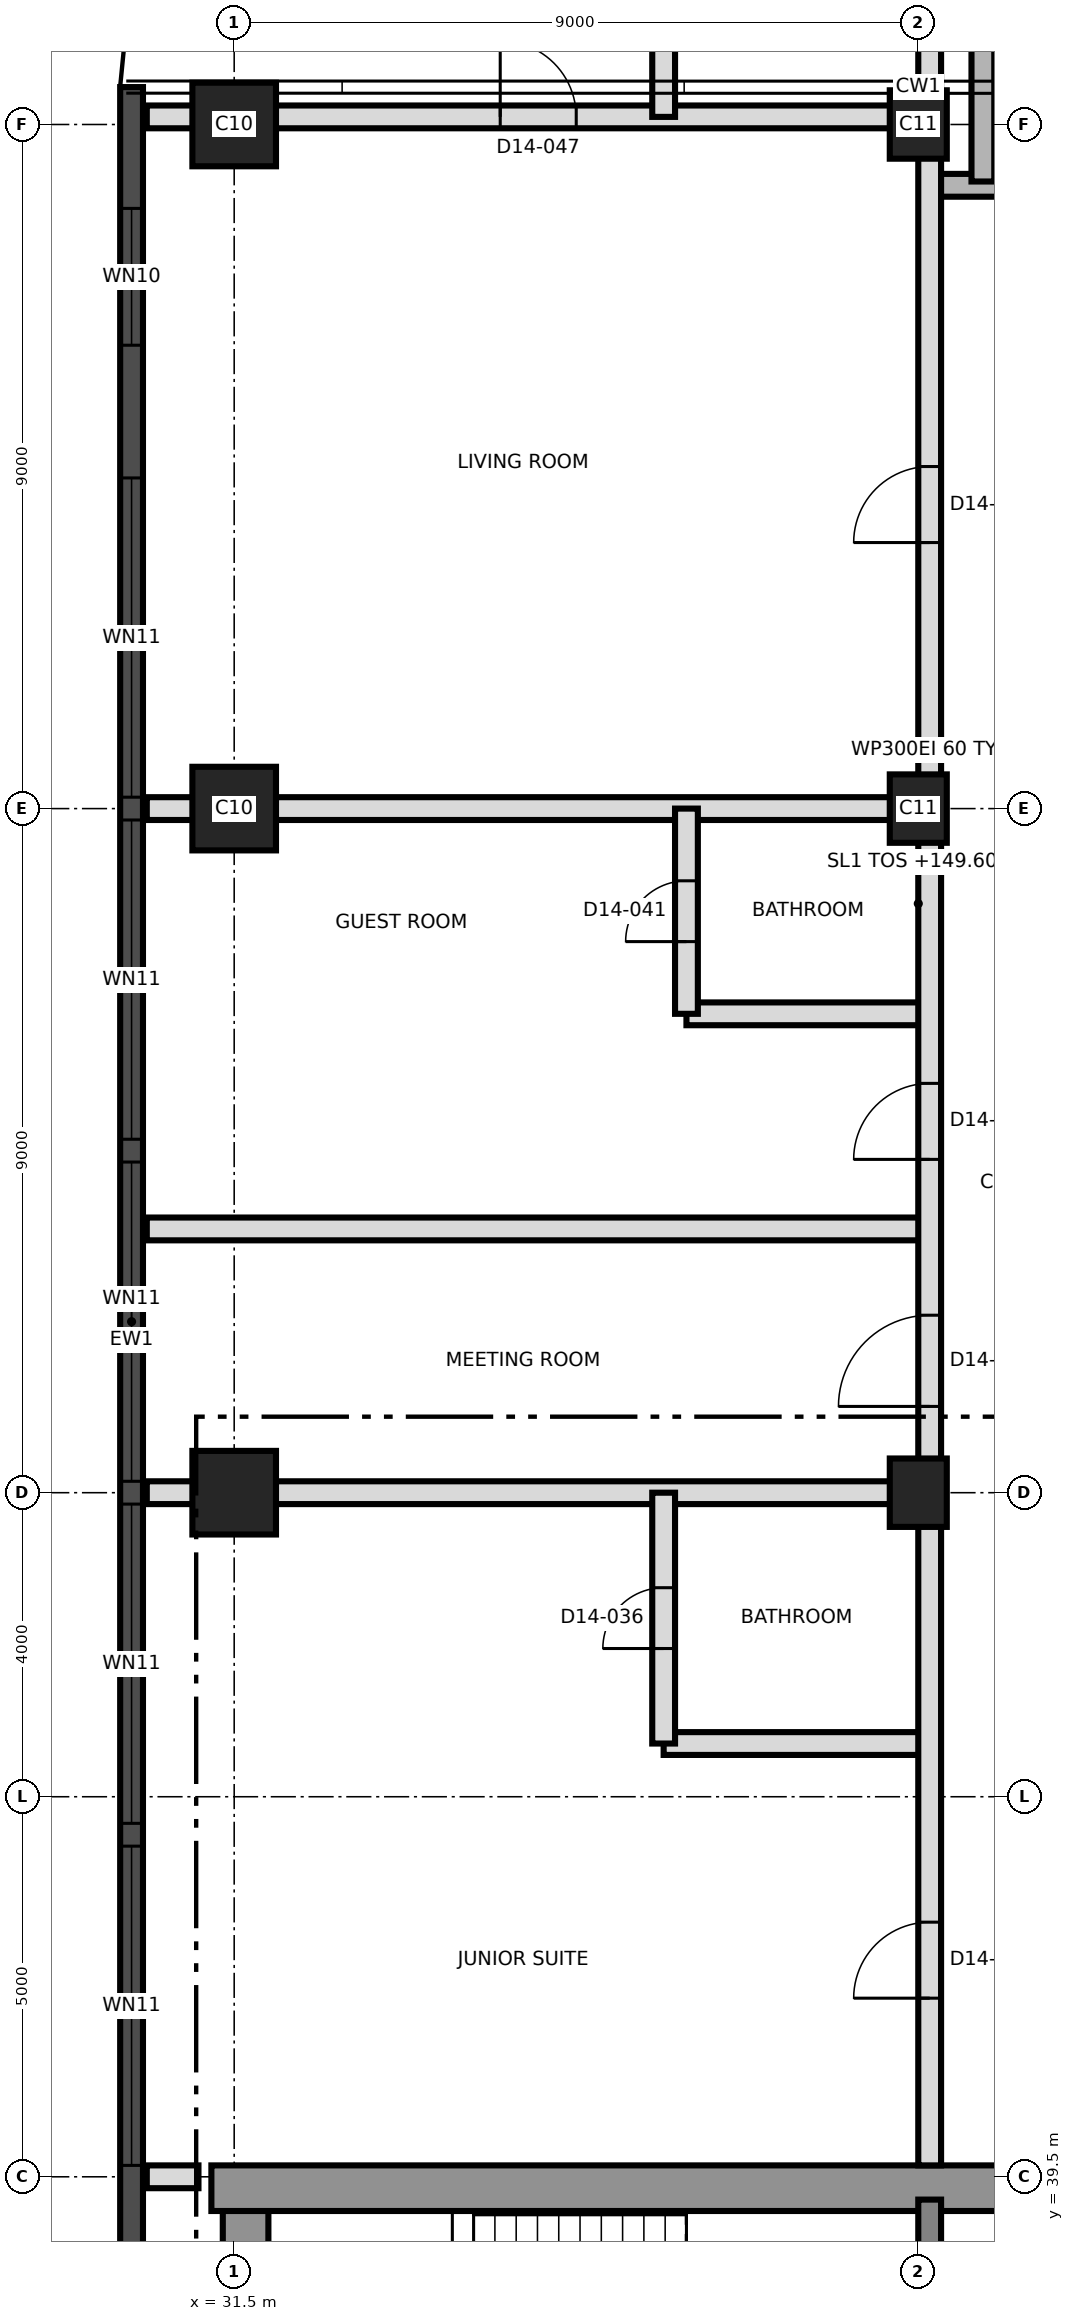
"""IFC4 building model, lengths in metres.
Left out: names, types, materials, properties, quantities, classifications, styles, units other than length and angle.
Written with IfcOpenShell. Run it as: python <this file> out.ifc"""

import sys

from ifc_helpers import new_model, si_unit, direction, frame, frame_2d, origin, origin_2d, place, context, subcontext, project, spatial, rectangle, extrude, element, fill, save


model = new_model("IFC4")
c1 = context("Model", 3, precision=1e-05, world=origin(), true_north=direction((0.0, 1.0)))
c2 = subcontext(c1, "Body", "Model", "MODEL_VIEW")
j1 = project(units=[si_unit("LENGTHUNIT", "METRE"), si_unit("PLANEANGLEUNIT", "RADIAN")], contexts=[c1])
p1 = place(None, origin())
s1 = spatial("IfcSite", under=j1, at=p1, CompositionType="ELEMENT")
p2 = place(p1, origin())
s2 = spatial("IfcBuilding", under=s1, at=p2, CompositionType="ELEMENT")
p3 = place(p2, frame((0.0, 0.0, 149.6)))
s3 = spatial("IfcBuildingStorey", under=s2, at=p3, CompositionType="ELEMENT", Elevation=149.6)
p4 = place(p3, frame((31.65, 21.8, 0.0), z_axis=(0.0, 0.0, 1.0), x_axis=(0.0, 1.0, 0.0)))
e1 = element("IfcWall", 1, at=p4, inside=s3, PredefinedType="SHEAR", context=c2, shape_type="SweptSolid", body=[
    extrude(rectangle(XDim=17.4, YDim=0.6, at=frame_2d((8.7, 0.0))), origin(), (0.0, 0.0, 1.0), 3.7),
])
p5 = place(p3, frame((31.2, 39.35, 0.0), z_axis=(0.0, 0.0, 1.0), x_axis=(1.0, 0.0, 0.0)))
e2 = element("IfcWall", 2, at=p5, inside=s3, PredefinedType="SHEAR", context=c2, shape_type="SweptSolid", body=[
    extrude(rectangle(XDim=27.0, YDim=0.6, at=frame_2d((13.5, 0.0))), origin(), (0.0, 0.0, 1.0), 3.7),
])
p6 = place(p5, frame((10.5, 0.0, 0.0)))
e3 = element("IfcOpeningElement", 3, at=p6, cuts=e2, PredefinedType="OPENING", context=c2, shape_type="SweptSolid", body=[
    extrude(rectangle(XDim=1.2, YDim=2.1, at=frame_2d((0.6, 1.05))), frame((0.0, 0.31, 0.0), z_axis=(0.0, -1.0, 0.0), x_axis=(1.0, 0.0, 0.0)), (0.0, 0.0, 1.0), 0.62),
])
p7 = place(p3, frame((40.65, 33.5, 0.0), z_axis=(0.0, 0.0, 1.0), x_axis=(0.0, 1.0, 0.0)))
e4 = element("IfcWall", 4, at=p7, inside=s3, PredefinedType="SHEAR", context=c2, shape_type="SweptSolid", body=[
    extrude(rectangle(XDim=5.7, YDim=0.3, at=frame_2d((2.85, 0.0))), origin(), (0.0, 0.0, 1.0), 3.7),
])
p8 = place(p3, frame((31.5, 48.5, 0.0), z_axis=(0.0, 0.0, 1.0), x_axis=(1.0, 0.0, 0.0)))
e5 = element("IfcColumn", 5, at=p8, inside=s3, PredefinedType="COLUMN", context=c2, shape_type="SweptSolid", body=[
    extrude(rectangle(XDim=1.1, YDim=1.1, at=origin_2d()), origin(), (0.0, 0.0, 1.0), 3.7),
])
p9 = place(p3, frame((40.5, 48.5, 0.0), z_axis=(0.0, 0.0, 1.0), x_axis=(0.0, 1.0, 0.0)))
e6 = element("IfcColumn", 6, at=p9, inside=s3, PredefinedType="COLUMN", context=c2, shape_type="SweptSolid", body=[
    extrude(rectangle(XDim=0.9, YDim=0.75, at=origin_2d()), origin(), (0.0, 0.0, 1.0), 3.7),
])
p10 = place(p3, frame((31.5, 57.5, 0.0), z_axis=(0.0, 0.0, 1.0), x_axis=(1.0, 0.0, 0.0)))
e7 = element("IfcColumn", 7, at=p10, inside=s3, PredefinedType="COLUMN", context=c2, shape_type="SweptSolid", body=[
    extrude(rectangle(XDim=1.1, YDim=1.1, at=origin_2d()), origin(), (0.0, 0.0, 1.0), 3.7),
])
p11 = place(p3, frame((40.5, 57.5, 0.0), z_axis=(0.0, 0.0, 1.0), x_axis=(0.0, 1.0, 0.0)))
e8 = element("IfcColumn", 8, at=p11, inside=s3, PredefinedType="COLUMN", context=c2, shape_type="SweptSolid", body=[
    extrude(rectangle(XDim=0.9, YDim=0.75, at=origin_2d()), origin(), (0.0, 0.0, 1.0), 3.7),
])
p12 = place(p3, frame((31.5, 66.5, 0.0), z_axis=(0.0, 0.0, 1.0), x_axis=(1.0, 0.0, 0.0)))
e9 = element("IfcColumn", 9, at=p12, inside=s3, PredefinedType="COLUMN", context=c2, shape_type="SweptSolid", body=[
    extrude(rectangle(XDim=1.1, YDim=1.1, at=origin_2d()), origin(), (0.0, 0.0, 1.0), 3.7),
])
p13 = place(p3, frame((40.5, 66.5, 0.0), z_axis=(0.0, 0.0, 1.0), x_axis=(0.0, 1.0, 0.0)))
e10 = element("IfcColumn", 10, at=p13, inside=s3, PredefinedType="COLUMN", context=c2, shape_type="SweptSolid", body=[
    extrude(rectangle(XDim=0.9, YDim=0.75, at=origin_2d()), origin(), (0.0, 0.0, 1.0), 3.7),
])
p14 = place(p3, frame((30.15, 66.992, 0.0), z_axis=(0.0, 0.0, 1.0), x_axis=(0.0, -1.0, 0.0)))
e11 = element("IfcWall", 11, at=p14, inside=s3, PredefinedType="SOLIDWALL", context=c2, shape_type="SweptSolid", body=[
    extrude(rectangle(XDim=32.968, YDim=0.3, at=frame_2d((16.484, 0.0))), origin(), (0.0, 0.0, 1.0), 3.4),
])
p15 = place(p14, frame((1.596, 0.0, 0.3)))
e12 = element("IfcOpeningElement", 12, at=p15, cuts=e11, PredefinedType="OPENING", context=c2, shape_type="SweptSolid", body=[
    extrude(rectangle(XDim=1.8, YDim=2.4, at=frame_2d((0.9, 1.2))), frame((0.0, 0.16, 0.0), z_axis=(0.0, -1.0, 0.0), x_axis=(1.0, 0.0, 0.0)), (0.0, 0.0, 1.0), 0.32),
])
p16 = place(p14, frame((5.142, 0.0, 0.9)))
e13 = element("IfcOpeningElement", 13, at=p16, cuts=e11, PredefinedType="OPENING", context=c2, shape_type="SweptSolid", body=[
    extrude(rectangle(XDim=4.2, YDim=1.5, at=frame_2d((2.1, 0.75))), frame((0.0, 0.16, 0.0), z_axis=(0.0, -1.0, 0.0), x_axis=(1.0, 0.0, 0.0)), (0.0, 0.0, 1.0), 0.32),
])
p17 = place(p14, frame((9.642, 0.0, 0.9)))
e14 = element("IfcOpeningElement", 14, at=p17, cuts=e11, PredefinedType="OPENING", context=c2, shape_type="SweptSolid", body=[
    extrude(rectangle(XDim=4.2, YDim=1.5, at=frame_2d((2.1, 0.75))), frame((0.0, 0.16, 0.0), z_axis=(0.0, -1.0, 0.0), x_axis=(1.0, 0.0, 0.0)), (0.0, 0.0, 1.0), 0.32),
])
p18 = place(p14, frame((14.142, 0.0, 0.9)))
e15 = element("IfcOpeningElement", 15, at=p18, cuts=e11, PredefinedType="OPENING", context=c2, shape_type="SweptSolid", body=[
    extrude(rectangle(XDim=4.2, YDim=1.5, at=frame_2d((2.1, 0.75))), frame((0.0, 0.16, 0.0), z_axis=(0.0, -1.0, 0.0), x_axis=(1.0, 0.0, 0.0)), (0.0, 0.0, 1.0), 0.32),
])
p19 = place(p14, frame((18.642, 0.0, 0.9)))
e16 = element("IfcOpeningElement", 16, at=p19, cuts=e11, PredefinedType="OPENING", context=c2, shape_type="SweptSolid", body=[
    extrude(rectangle(XDim=4.2, YDim=1.5, at=frame_2d((2.1, 0.75))), frame((0.0, 0.16, 0.0), z_axis=(0.0, -1.0, 0.0), x_axis=(1.0, 0.0, 0.0)), (0.0, 0.0, 1.0), 0.32),
])
p20 = place(p14, frame((23.142, 0.0, 0.9)))
e17 = element("IfcOpeningElement", 17, at=p20, cuts=e11, PredefinedType="OPENING", context=c2, shape_type="SweptSolid", body=[
    extrude(rectangle(XDim=4.2, YDim=1.5, at=frame_2d((2.1, 0.75))), frame((0.0, 0.16, 0.0), z_axis=(0.0, -1.0, 0.0), x_axis=(1.0, 0.0, 0.0)), (0.0, 0.0, 1.0), 0.32),
])
p21 = place(p14, frame((29.33, 0.0, 0.3)))
e18 = element("IfcOpeningElement", 18, at=p21, cuts=e11, PredefinedType="OPENING", context=c2, shape_type="SweptSolid", body=[
    extrude(rectangle(XDim=1.8, YDim=2.4, at=frame_2d((0.9, 1.2))), frame((0.0, 0.16, 0.0), z_axis=(0.0, -1.0, 0.0), x_axis=(1.0, 0.0, 0.0)), (0.0, 0.0, 1.0), 0.32),
])
p22 = place(p3, frame((30.35, 39.5, 0.0), z_axis=(0.0, 0.0, 1.0), x_axis=(1.0, 0.0, 0.0)))
e19 = element("IfcWall", 19, at=p22, inside=s3, PredefinedType="PARTITIONING", context=c2, shape_type="SweptSolid", body=[
    extrude(rectangle(XDim=0.68, YDim=0.3, at=frame_2d((0.34, 0.0))), origin(), (0.0, 0.0, 1.0), 3.35),
])
p23 = place(p3, frame((37.15, 45.2, 0.0), z_axis=(0.0, 0.0, 1.0), x_axis=(1.0, 0.0, 0.0)))
e20 = element("IfcWall", 20, at=p23, inside=s3, PredefinedType="PARTITIONING", context=c2, shape_type="SweptSolid", body=[
    extrude(rectangle(XDim=3.5, YDim=0.3, at=frame_2d((1.75, 0.0))), origin(), (0.0, 0.0, 1.0), 3.4),
])
for number, where, z_axis, x_axis in (
    (21, (30.35, 48.5, 0.0), (0.0, 0.0, 1.0), (1.0, 0.0, 0.0)),
    (22, (30.35, 51.97, 0.0), (0.0, 0.0, 1.0), (1.0, 0.0, 0.0)),
):
    element("IfcWall", number, at=place(p3, frame(where, z_axis=z_axis, x_axis=x_axis)), inside=s3, PredefinedType="PARTITIONING", context=c2, shape_type="SweptSolid", body=[
        extrude(rectangle(XDim=10.3, YDim=0.3, at=frame_2d((5.15, 0.0))), origin(), (0.0, 0.0, 1.0), 3.35),
    ])
p24 = place(p3, frame((37.45, 54.8, 0.0), z_axis=(0.0, 0.0, 1.0), x_axis=(1.0, 0.0, 0.0)))
e23 = element("IfcWall", 23, at=p24, inside=s3, PredefinedType="PARTITIONING", context=c2, shape_type="SweptSolid", body=[
    extrude(rectangle(XDim=3.2, YDim=0.3, at=frame_2d((1.6, 0.0))), origin(), (0.0, 0.0, 1.0), 3.4),
])
p25 = place(p3, frame((30.35, 57.5, 0.0), z_axis=(0.0, 0.0, 1.0), x_axis=(1.0, 0.0, 0.0)))
e24 = element("IfcWall", 24, at=p25, inside=s3, PredefinedType="PARTITIONING", context=c2, shape_type="SweptSolid", body=[
    extrude(rectangle(XDim=10.3, YDim=0.3, at=frame_2d((5.15, 0.0))), origin(), (0.0, 0.0, 1.0), 3.35),
])
p26 = place(p3, frame((40.65, 65.7, 0.0), z_axis=(0.0, 0.0, 1.0), x_axis=(1.0, 0.0, 0.0)))
e25 = element("IfcWall", 25, at=p26, inside=s3, PredefinedType="SHEAR", context=c2, shape_type="SweptSolid", body=[
    extrude(rectangle(XDim=6.2, YDim=0.3, at=frame_2d((3.1, 0.0))), origin(), (0.0, 0.0, 1.0), 3.4),
])
p27 = place(p26, frame((1.1, 0.0, 0.0)))
e26 = element("IfcOpeningElement", 26, at=p27, cuts=e25, PredefinedType="OPENING", context=c2, shape_type="SweptSolid", body=[
    extrude(rectangle(XDim=1.2, YDim=2.1, at=frame_2d((0.6, 1.05))), frame((0.0, 0.16, 0.0), z_axis=(0.0, -1.0, 0.0), x_axis=(1.0, 0.0, 0.0)), (0.0, 0.0, 1.0), 0.32),
])
p28 = place(p3, frame((30.35, 66.6, 0.0), z_axis=(0.0, 0.0, 1.0), x_axis=(1.0, 0.0, 0.0)))
e27 = element("IfcWall", 27, at=p28, inside=s3, PredefinedType="PARTITIONING", context=c2, shape_type="SweptSolid", body=[
    extrude(rectangle(XDim=10.3, YDim=0.3, at=frame_2d((5.15, 0.0))), origin(), (0.0, 0.0, 1.0), 3.35),
])
p29 = place(p28, frame((4.65, 0.0, 0.0)))
e28 = element("IfcOpeningElement", 28, at=p29, cuts=e27, PredefinedType="OPENING", context=c2, shape_type="SweptSolid", body=[
    extrude(rectangle(XDim=1.0, YDim=2.1, at=frame_2d((0.5, 1.05))), frame((0.0, 0.16, 0.0), z_axis=(0.0, -1.0, 0.0), x_axis=(1.0, 0.0, 0.0)), (0.0, 0.0, 1.0), 0.32),
])
p30 = place(p3, frame((37.15, 45.2, 0.0), z_axis=(0.0, 0.0, 1.0), x_axis=(0.0, 1.0, 0.0)))
e29 = element("IfcWall", 29, at=p30, inside=s3, PredefinedType="PARTITIONING", context=c2, shape_type="SweptSolid", body=[
    extrude(rectangle(XDim=3.3, YDim=0.3, at=frame_2d((1.65, 0.0))), origin(), (0.0, 0.0, 1.0), 3.4),
])
p31 = place(p30, frame((1.25, 0.0, 0.0)))
e30 = element("IfcOpeningElement", 30, at=p31, cuts=e29, PredefinedType="OPENING", context=c2, shape_type="SweptSolid", body=[
    extrude(rectangle(XDim=0.8, YDim=2.1, at=frame_2d((0.4, 1.05))), frame((0.0, 0.16, 0.0), z_axis=(0.0, -1.0, 0.0), x_axis=(1.0, 0.0, 0.0)), (0.0, 0.0, 1.0), 0.32),
])
p32 = place(p3, frame((37.15, 66.6, 0.0), z_axis=(0.0, 0.0, 1.0), x_axis=(0.0, 1.0, 0.0)))
e31 = element("IfcWall", 31, at=p32, inside=s3, PredefinedType="PARTITIONING", context=c2, shape_type="SweptSolid", body=[
    extrude(rectangle(XDim=3.3, YDim=0.3, at=frame_2d((1.65, 0.0))), origin(), (0.0, 0.0, 1.0), 3.4),
])
p33 = place(p32, frame((1.25, 0.0, 0.0)))
e32 = element("IfcOpeningElement", 32, at=p33, cuts=e31, PredefinedType="OPENING", context=c2, shape_type="SweptSolid", body=[
    extrude(rectangle(XDim=0.8, YDim=2.1, at=frame_2d((0.4, 1.05))), frame((0.0, 0.16, 0.0), z_axis=(0.0, -1.0, 0.0), x_axis=(1.0, 0.0, 0.0)), (0.0, 0.0, 1.0), 0.32),
])
p34 = place(p3, frame((37.45, 54.8, 0.0), z_axis=(0.0, 0.0, 1.0), x_axis=(0.0, 1.0, 0.0)))
e33 = element("IfcWall", 33, at=p34, inside=s3, PredefinedType="PARTITIONING", context=c2, shape_type="SweptSolid", body=[
    extrude(rectangle(XDim=2.7, YDim=0.3, at=frame_2d((1.35, 0.0))), origin(), (0.0, 0.0, 1.0), 3.4),
])
p35 = place(p34, frame((0.95, 0.0, 0.0)))
e34 = element("IfcOpeningElement", 34, at=p35, cuts=e33, PredefinedType="OPENING", context=c2, shape_type="SweptSolid", body=[
    extrude(rectangle(XDim=0.8, YDim=2.1, at=frame_2d((0.4, 1.05))), frame((0.0, 0.16, 0.0), z_axis=(0.0, -1.0, 0.0), x_axis=(1.0, 0.0, 0.0)), (0.0, 0.0, 1.0), 0.32),
])
p36 = place(p3, frame((40.65, 39.65, 0.0), z_axis=(0.0, 0.0, 1.0), x_axis=(0.0, 1.0, 0.0)))
e35 = element("IfcWall", 35, at=p36, inside=s3, PredefinedType="PARTITIONING", context=c2, shape_type="SweptSolid", body=[
    extrude(rectangle(XDim=37.24, YDim=0.3, at=frame_2d((18.62, 0.0))), origin(), (0.0, 0.0, 1.0), 3.35),
])
p37 = place(p36, frame((2.2, 0.0, 0.0)))
e36 = element("IfcOpeningElement", 36, at=p37, cuts=e35, PredefinedType="OPENING", context=c2, shape_type="SweptSolid", body=[
    extrude(rectangle(XDim=1.0, YDim=2.4, at=frame_2d((0.5, 1.2))), frame((0.0, 0.16, 0.0), z_axis=(0.0, -1.0, 0.0), x_axis=(1.0, 0.0, 0.0)), (0.0, 0.0, 1.0), 0.32),
])
p38 = place(p36, frame((9.985, 0.0, 0.0)))
e37 = element("IfcOpeningElement", 37, at=p38, cuts=e35, PredefinedType="OPENING", context=c2, shape_type="SweptSolid", body=[
    extrude(rectangle(XDim=1.2, YDim=2.1, at=frame_2d((0.6, 1.05))), frame((0.0, 0.16, 0.0), z_axis=(0.0, -1.0, 0.0), x_axis=(1.0, 0.0, 0.0)), (0.0, 0.0, 1.0), 0.32),
])
p39 = place(p36, frame((13.235, 0.0, 0.0)))
e38 = element("IfcOpeningElement", 38, at=p39, cuts=e35, PredefinedType="OPENING", context=c2, shape_type="SweptSolid", body=[
    extrude(rectangle(XDim=1.0, YDim=2.1, at=frame_2d((0.5, 1.05))), frame((0.0, 0.16, 0.0), z_axis=(0.0, -1.0, 0.0), x_axis=(1.0, 0.0, 0.0)), (0.0, 0.0, 1.0), 0.32),
])
p40 = place(p36, frame((21.35, 0.0, 0.0)))
e39 = element("IfcOpeningElement", 39, at=p40, cuts=e35, PredefinedType="OPENING", context=c2, shape_type="SweptSolid", body=[
    extrude(rectangle(XDim=1.0, YDim=2.4, at=frame_2d((0.5, 1.2))), frame((0.0, 0.16, 0.0), z_axis=(0.0, -1.0, 0.0), x_axis=(1.0, 0.0, 0.0)), (0.0, 0.0, 1.0), 0.32),
])
p41 = place(p3, frame((41.35, 65.75, 0.0), z_axis=(0.0, 0.0, 1.0), x_axis=(0.0, 1.0, 0.0)))
e40 = element("IfcWall", 40, at=p41, inside=s3, PredefinedType="SHEAR", context=c2, shape_type="SweptSolid", body=[
    extrude(rectangle(XDim=8.85, YDim=0.3, at=frame_2d((4.425, 0.0))), origin(), (0.0, 0.0, 1.0), 3.4),
])
p42 = place(p15, origin())
e41 = element("IfcWindow", 41, at=p42, inside=s3, PartitioningType="SINGLE_PANEL", PredefinedType="WINDOW", context=c2, shape_type="SweptSolid", body=[
    extrude(rectangle(XDim=1.8, YDim=2.4, at=frame_2d((0.9, 1.2))), frame((0.0, 0.03, 0.0), z_axis=(0.0, -1.0, 0.0), x_axis=(1.0, 0.0, 0.0)), (0.0, 0.0, 1.0), 0.06),
])
fill(e12, e41)
p43 = place(p16, origin())
e42 = element("IfcWindow", 42, at=p43, inside=s3, PartitioningType="SINGLE_PANEL", PredefinedType="WINDOW", context=c2, shape_type="SweptSolid", body=[
    extrude(rectangle(XDim=4.2, YDim=1.5, at=frame_2d((2.1, 0.75))), frame((0.0, 0.03, 0.0), z_axis=(0.0, -1.0, 0.0), x_axis=(1.0, 0.0, 0.0)), (0.0, 0.0, 1.0), 0.06),
])
fill(e13, e42)
p44 = place(p17, origin())
e43 = element("IfcWindow", 43, at=p44, inside=s3, PartitioningType="SINGLE_PANEL", PredefinedType="WINDOW", context=c2, shape_type="SweptSolid", body=[
    extrude(rectangle(XDim=4.2, YDim=1.5, at=frame_2d((2.1, 0.75))), frame((0.0, 0.03, 0.0), z_axis=(0.0, -1.0, 0.0), x_axis=(1.0, 0.0, 0.0)), (0.0, 0.0, 1.0), 0.06),
])
fill(e14, e43)
p45 = place(p18, origin())
e44 = element("IfcWindow", 44, at=p45, inside=s3, PartitioningType="SINGLE_PANEL", PredefinedType="WINDOW", context=c2, shape_type="SweptSolid", body=[
    extrude(rectangle(XDim=4.2, YDim=1.5, at=frame_2d((2.1, 0.75))), frame((0.0, 0.03, 0.0), z_axis=(0.0, -1.0, 0.0), x_axis=(1.0, 0.0, 0.0)), (0.0, 0.0, 1.0), 0.06),
])
fill(e15, e44)
p46 = place(p19, origin())
e45 = element("IfcWindow", 45, at=p46, inside=s3, PartitioningType="SINGLE_PANEL", PredefinedType="WINDOW", context=c2, shape_type="SweptSolid", body=[
    extrude(rectangle(XDim=4.2, YDim=1.5, at=frame_2d((2.1, 0.75))), frame((0.0, 0.03, 0.0), z_axis=(0.0, -1.0, 0.0), x_axis=(1.0, 0.0, 0.0)), (0.0, 0.0, 1.0), 0.06),
])
fill(e16, e45)
p47 = place(p20, origin())
e46 = element("IfcWindow", 46, at=p47, inside=s3, PartitioningType="SINGLE_PANEL", PredefinedType="WINDOW", context=c2, shape_type="SweptSolid", body=[
    extrude(rectangle(XDim=4.2, YDim=1.5, at=frame_2d((2.1, 0.75))), frame((0.0, 0.03, 0.0), z_axis=(0.0, -1.0, 0.0), x_axis=(1.0, 0.0, 0.0)), (0.0, 0.0, 1.0), 0.06),
])
fill(e17, e46)
p48 = place(p31, origin())
e47 = element("IfcDoor", 47, at=p48, inside=s3, OperationType="SINGLE_SWING_RIGHT", PredefinedType="DOOR", context=c2, shape_type="SweptSolid", body=[
    extrude(rectangle(XDim=0.8, YDim=2.1, at=frame_2d((0.4, 1.05))), frame((0.0, 0.025, 0.0), z_axis=(0.0, -1.0, 0.0), x_axis=(1.0, 0.0, 0.0)), (0.0, 0.0, 1.0), 0.05),
])
fill(e30, e47)
p49 = place(p37, origin())
e48 = element("IfcDoor", 48, at=p49, inside=s3, OperationType="SINGLE_SWING_LEFT", PredefinedType="DOOR", context=c2, shape_type="SweptSolid", body=[
    extrude(rectangle(XDim=1.0, YDim=2.4, at=frame_2d((0.5, 1.2))), frame((0.0, 0.025, 0.0), z_axis=(0.0, -1.0, 0.0), x_axis=(1.0, 0.0, 0.0)), (0.0, 0.0, 1.0), 0.05),
])
fill(e36, e48)
p50 = place(p38, origin())
e49 = element("IfcDoor", 49, at=p50, inside=s3, OperationType="SINGLE_SWING_RIGHT", PredefinedType="DOOR", context=c2, shape_type="SweptSolid", body=[
    extrude(rectangle(XDim=1.2, YDim=2.1, at=frame_2d((0.6, 1.05))), frame((0.0, 0.025, 0.0), z_axis=(0.0, -1.0, 0.0), x_axis=(1.0, 0.0, 0.0)), (0.0, 0.0, 1.0), 0.05),
])
fill(e37, e49)
p51 = place(p35, origin())
e50 = element("IfcDoor", 50, at=p51, inside=s3, OperationType="SINGLE_SWING_LEFT", PredefinedType="DOOR", context=c2, shape_type="SweptSolid", body=[
    extrude(rectangle(XDim=0.8, YDim=2.1, at=frame_2d((0.4, 1.05))), frame((0.0, 0.025, 0.0), z_axis=(0.0, -1.0, 0.0), x_axis=(1.0, 0.0, 0.0)), (0.0, 0.0, 1.0), 0.05),
])
fill(e34, e50)
p52 = place(p39, origin())
e51 = element("IfcDoor", 51, at=p52, inside=s3, OperationType="SINGLE_SWING_LEFT", PredefinedType="DOOR", context=c2, shape_type="SweptSolid", body=[
    extrude(rectangle(XDim=1.0, YDim=2.1, at=frame_2d((0.5, 1.05))), frame((0.0, 0.025, 0.0), z_axis=(0.0, -1.0, 0.0), x_axis=(1.0, 0.0, 0.0)), (0.0, 0.0, 1.0), 0.05),
])
fill(e38, e51)
p53 = place(p40, origin())
e52 = element("IfcDoor", 52, at=p53, inside=s3, OperationType="SINGLE_SWING_RIGHT", PredefinedType="DOOR", context=c2, shape_type="SweptSolid", body=[
    extrude(rectangle(XDim=1.0, YDim=2.4, at=frame_2d((0.5, 1.2))), frame((0.0, 0.025, 0.0), z_axis=(0.0, -1.0, 0.0), x_axis=(1.0, 0.0, 0.0)), (0.0, 0.0, 1.0), 0.05),
])
fill(e39, e52)
p54 = place(p29, origin())
e53 = element("IfcDoor", 53, at=p54, inside=s3, OperationType="SINGLE_SWING_LEFT", PredefinedType="DOOR", context=c2, shape_type="SweptSolid", body=[
    extrude(rectangle(XDim=1.0, YDim=2.1, at=frame_2d((0.5, 1.05))), frame((0.0, 0.025, 0.0), z_axis=(0.0, -1.0, 0.0), x_axis=(1.0, 0.0, 0.0)), (0.0, 0.0, 1.0), 0.05),
])
fill(e28, e53)
save(model, sys.argv[1])
